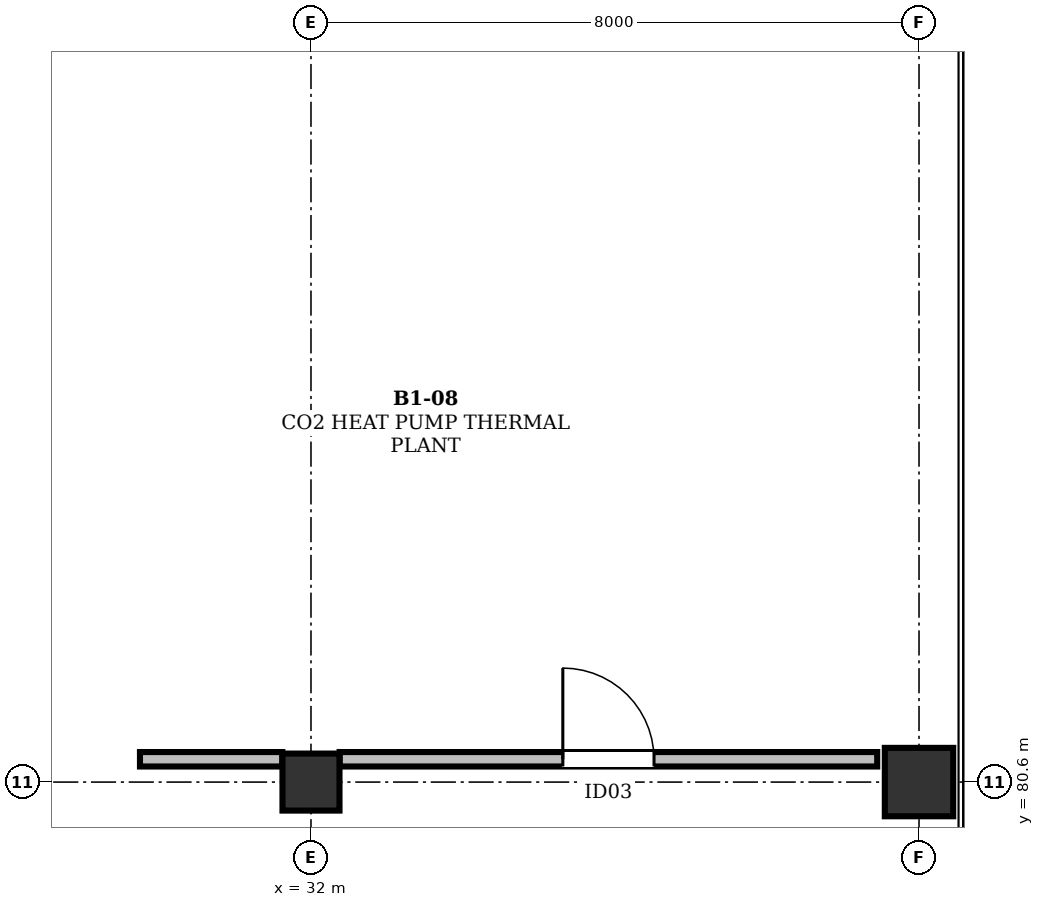
"""IFC4 building model, lengths in metres.
Left out: names, types, materials, properties, quantities, classifications, styles, units other than length and angle.
Written with IfcOpenShell. Run it as: python <this file> out.ifc"""

import sys

from ifc_helpers import new_model, si_unit, direction, frame, frame_2d, origin, origin_2d, place, context, subcontext, project, spatial, rectangle, extrude, element, fill, save


model = new_model("IFC4")
c1 = context("Model", 3, precision=1e-05, world=origin(), true_north=direction((0.0, 1.0)))
c2 = subcontext(c1, "Body", "Model", "MODEL_VIEW")
j1 = project(units=[si_unit("LENGTHUNIT", "METRE"), si_unit("PLANEANGLEUNIT", "RADIAN")], contexts=[c1])
p1 = place(None, origin())
s1 = spatial("IfcSite", under=j1, at=p1, CompositionType="ELEMENT")
p2 = place(p1, origin())
s2 = spatial("IfcBuilding", under=s1, at=p2, CompositionType="ELEMENT")
p3 = place(p2, frame((0.0, 0.0, -4.8)))
s3 = spatial("IfcBuildingStorey", under=s2, at=p3, CompositionType="ELEMENT", Elevation=-4.8)
p4 = place(p3, frame((32.0, 80.6, 0.0), z_axis=(0.0, 0.0, 1.0), x_axis=(1.0, 0.0, 0.0)))
e1 = element("IfcColumn", 1, at=p4, inside=s3, PredefinedType="COLUMN", context=c2, shape_type="SweptSolid", body=[
    extrude(rectangle(XDim=0.75, YDim=0.75, at=origin_2d()), origin(), (0.0, 0.0, 1.0), 4.8),
])
p5 = place(p3, frame((40.0, 80.6, 0.0), z_axis=(0.0, 0.0, 1.0), x_axis=(1.0, 0.0, 0.0)))
e2 = element("IfcColumn", 2, at=p5, inside=s3, PredefinedType="COLUMN", context=c2, shape_type="SweptSolid", body=[
    extrude(rectangle(XDim=0.9, YDim=0.9, at=origin_2d()), origin(), (0.0, 0.0, 1.0), 4.8),
])
p6 = place(p3, frame((29.75, 80.9, 0.0), z_axis=(0.0, 0.0, 1.0), x_axis=(1.0, 0.0, 0.0)))
e3 = element("IfcWall", 3, at=p6, inside=s3, PredefinedType="SOLIDWALL", context=c2, shape_type="SweptSolid", body=[
    extrude(rectangle(XDim=1.873, YDim=0.19, at=frame_2d((0.937, 0.0))), origin(), (0.0, 0.0, 1.0), 3.255),
])
p7 = place(p3, frame((32.377, 80.9, 0.0), z_axis=(0.0, 0.0, 1.0), x_axis=(1.0, 0.0, 0.0)))
e4 = element("IfcWall", 4, at=p7, inside=s3, PredefinedType="SOLIDWALL", context=c2, shape_type="SweptSolid", body=[
    extrude(rectangle(XDim=7.073, YDim=0.19, at=frame_2d((3.537, 0.0))), origin(), (0.0, 0.0, 1.0), 3.255),
])
p8 = place(p7, frame((2.937, 0.0, 0.0)))
e5 = element("IfcOpeningElement", 5, at=p8, cuts=e4, PredefinedType="OPENING", context=c2, shape_type="SweptSolid", body=[
    extrude(rectangle(XDim=1.2, YDim=2.15, at=frame_2d((0.6, 1.075))), frame((0.0, 0.107, 0.0), z_axis=(0.0, -1.0, 0.0), x_axis=(1.0, 0.0, 0.0)), (0.0, 0.0, 1.0), 0.214),
])
p9 = place(p8, origin())
e6 = element("IfcDoor", 6, at=p9, inside=s3, OperationType="SINGLE_SWING_LEFT", PredefinedType="DOOR", context=c2, shape_type="SweptSolid", body=[
    extrude(rectangle(XDim=1.2, YDim=2.15, at=frame_2d((0.6, 1.075))), frame((0.0, 0.025, 0.0), z_axis=(0.0, -1.0, 0.0), x_axis=(1.0, 0.0, 0.0)), (0.0, 0.0, 1.0), 0.05),
])
fill(e5, e6)
save(model, sys.argv[1])
